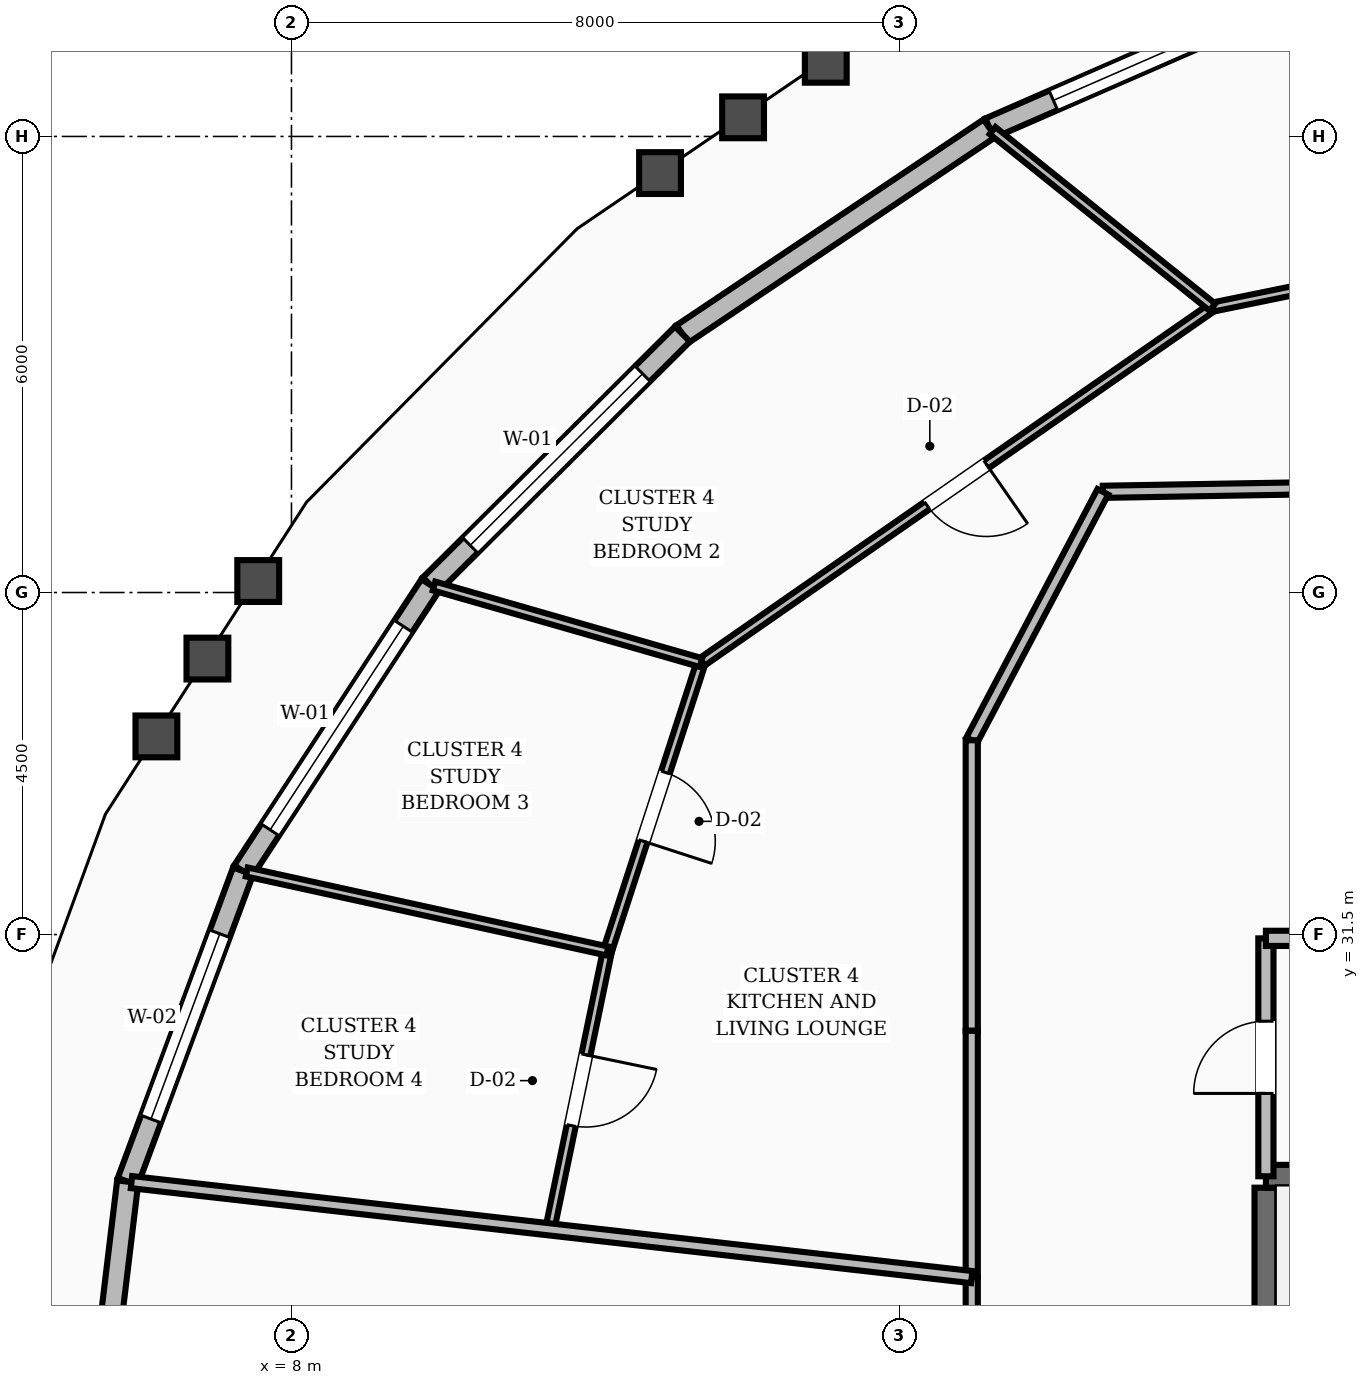
"""IFC4 building model, lengths in metres.
Left out: names, types, materials, properties, quantities, classifications, styles, units other than length and angle.
Written with IfcOpenShell. Run it as: python <this file> out.ifc"""

import sys

from ifc_helpers import new_model, si_unit, direction, frame, frame_2d, origin, place, context, subcontext, project, spatial, rectangle, extrude, element, fill, save


model = new_model("IFC4")
c1 = context("Model", 3, precision=1e-05, world=origin(), true_north=direction((0.0, 1.0)))
c2 = subcontext(c1, "Body", "Model", "MODEL_VIEW")
j1 = project(units=[si_unit("LENGTHUNIT", "METRE"), si_unit("PLANEANGLEUNIT", "RADIAN")], contexts=[c1])
p1 = place(None, origin())
s1 = spatial("IfcSite", under=j1, at=p1, CompositionType="ELEMENT")
p2 = place(p1, origin())
s2 = spatial("IfcBuilding", under=s1, at=p2, CompositionType="ELEMENT")
p3 = place(p2, frame((0.0, 0.0, 124.4)))
s3 = spatial("IfcBuildingStorey", under=s2, at=p3, CompositionType="ELEMENT", Elevation=124.4)
p4 = place(p3, frame((20.82, 19.43, 0.0), z_axis=(0.0, 0.0, 1.0), x_axis=(0.0, 1.0, 0.0)))
e1 = element("IfcWall", 1, at=p4, inside=s3, PredefinedType="SHEAR", context=c2, shape_type="SweptSolid", body=[
    extrude(rectangle(XDim=8.74, YDim=0.3, at=frame_2d((4.37, 0.0))), origin(), (0.0, 0.0, 1.0), 3.6),
])
p5 = place(p3, frame((20.82, 28.32, 0.0), z_axis=(0.0, 0.0, 1.0), x_axis=(1.0, 0.0, 0.0)))
e2 = element("IfcWall", 2, at=p5, inside=s3, PredefinedType="SHEAR", context=c2, shape_type="SweptSolid", body=[
    extrude(rectangle(XDim=3.6, YDim=0.3, at=frame_2d((1.8, 0.0))), origin(), (0.0, 0.0, 1.0), 3.6),
])
p6 = place(p3, frame((21.795, 44.121, 0.0), z_axis=(0.0, 0.0, 1.0), x_axis=(-0.916473381058, -0.400095665825, 0.0)))
e3 = element("IfcWall", 3, at=p6, inside=s3, PredefinedType="STANDARD", context=c2, shape_type="SweptSolid", body=[
    extrude(rectangle(XDim=5.031, YDim=0.28, at=frame_2d((2.515, 0.0))), origin(), (0.0, 0.0, 1.0), 2.82),
])
p7 = place(p6, frame((0.915, 0.0, 0.8)))
e4 = element("IfcOpeningElement", 4, at=p7, cuts=e3, PredefinedType="OPENING", context=c2, shape_type="SweptSolid", body=[
    extrude(rectangle(XDim=3.2, YDim=1.65, at=frame_2d((1.6, 0.825))), frame((0.0, 0.15, 0.0), z_axis=(0.0, -1.0, 0.0), x_axis=(1.0, 0.0, 0.0)), (0.0, 0.0, 1.0), 0.3),
])
p8 = place(p3, frame((17.185, 42.108, 0.0), z_axis=(0.0, 0.0, 1.0), x_axis=(-0.83069663506, -0.556725336679, 0.0)))
e5 = element("IfcWall", 5, at=p8, inside=s3, PredefinedType="STANDARD", context=c2, shape_type="SweptSolid", body=[
    extrude(rectangle(XDim=4.865, YDim=0.28, at=frame_2d((2.432, 0.0))), origin(), (0.0, 0.0, 1.0), 2.82),
])
p9 = place(p3, frame((13.144, 39.4, 0.0), z_axis=(0.0, 0.0, 1.0), x_axis=(-0.708826657364, -0.70538271159, 0.0)))
e6 = element("IfcWall", 6, at=p9, inside=s3, PredefinedType="STANDARD", context=c2, shape_type="SweptSolid", body=[
    extrude(rectangle(XDim=4.679, YDim=0.28, at=frame_2d((2.339, 0.0))), origin(), (0.0, 0.0, 1.0), 2.82),
])
p10 = place(p9, frame((0.74, 0.0, 0.8)))
e7 = element("IfcOpeningElement", 7, at=p10, cuts=e6, PredefinedType="OPENING", context=c2, shape_type="SweptSolid", body=[
    extrude(rectangle(XDim=3.2, YDim=1.65, at=frame_2d((1.6, 0.825))), frame((0.0, 0.15, 0.0), z_axis=(0.0, -1.0, 0.0), x_axis=(1.0, 0.0, 0.0)), (0.0, 0.0, 1.0), 0.3),
])
p11 = place(p3, frame((9.827, 36.1, 0.0), z_axis=(0.0, 0.0, 1.0), x_axis=(-0.547581138096, -0.836752590197, 0.0)))
e8 = element("IfcWall", 8, at=p11, inside=s3, PredefinedType="STANDARD", context=c2, shape_type="SweptSolid", body=[
    extrude(rectangle(XDim=4.5, YDim=0.28, at=frame_2d((2.25, 0.0))), origin(), (0.0, 0.0, 1.0), 2.82),
])
p12 = place(p11, frame((0.65, 0.0, 0.8)))
e9 = element("IfcOpeningElement", 9, at=p12, cuts=e8, PredefinedType="OPENING", context=c2, shape_type="SweptSolid", body=[
    extrude(rectangle(XDim=3.2, YDim=1.65, at=frame_2d((1.6, 0.825))), frame((0.0, 0.15, 0.0), z_axis=(0.0, -1.0, 0.0), x_axis=(1.0, 0.0, 0.0)), (0.0, 0.0, 1.0), 0.3),
])
p13 = place(p3, frame((7.363, 32.334, 0.0), z_axis=(0.0, 0.0, 1.0), x_axis=(-0.348211846364, -0.937415868253, 0.0)))
e10 = element("IfcWall", 10, at=p13, inside=s3, PredefinedType="STANDARD", context=c2, shape_type="SweptSolid", body=[
    extrude(rectangle(XDim=4.358, YDim=0.28, at=frame_2d((2.179, 0.0))), origin(), (0.0, 0.0, 1.0), 2.82),
])
p14 = place(p13, frame((0.879, 0.0, 0.8)))
e11 = element("IfcOpeningElement", 11, at=p14, cuts=e10, PredefinedType="OPENING", context=c2, shape_type="SweptSolid", body=[
    extrude(rectangle(XDim=2.6, YDim=1.65, at=frame_2d((1.3, 0.825))), frame((0.0, 0.15, 0.0), z_axis=(0.0, -1.0, 0.0), x_axis=(1.0, 0.0, 0.0)), (0.0, 0.0, 1.0), 0.3),
])
p15 = place(p3, frame((5.846, 28.249, 0.0), z_axis=(0.0, 0.0, 1.0), x_axis=(-0.119687341708, -0.992811633813, 0.0)))
e12 = element("IfcWall", 12, at=p15, inside=s3, PredefinedType="STANDARD", context=c2, shape_type="SweptSolid", body=[
    extrude(rectangle(XDim=4.28, YDim=0.28, at=frame_2d((2.14, 0.0))), origin(), (0.0, 0.0, 1.0), 2.82),
])
p16 = place(p3, frame((20.82, 28.32, 0.0), z_axis=(0.0, 0.0, 1.0), x_axis=(0.0, 1.0, 0.0)))
e13 = element("IfcWall", 13, at=p16, inside=s3, PredefinedType="SOLIDWALL", context=c2, shape_type="SweptSolid", body=[
    extrude(rectangle(XDim=3.13, YDim=0.2, at=frame_2d((1.565, 0.0))), origin(), (0.0, 0.0, 1.0), 2.8),
])
p17 = place(p16, frame((1.09, 0.0, 0.0)))
e14 = element("IfcOpeningElement", 14, at=p17, cuts=e13, PredefinedType="OPENING", context=c2, shape_type="SweptSolid", body=[
    extrude(rectangle(XDim=0.95, YDim=2.1, at=frame_2d((0.475, 1.05))), frame((0.0, 0.11, 0.0), z_axis=(0.0, -1.0, 0.0), x_axis=(1.0, 0.0, 0.0)), (0.0, 0.0, 1.0), 0.22),
])
p18 = place(p3, frame((20.82, 31.45, 0.0), z_axis=(0.0, 0.0, 1.0), x_axis=(1.0, 0.0, 0.0)))
e15 = element("IfcWall", 15, at=p18, inside=s3, PredefinedType="SOLIDWALL", context=c2, shape_type="SweptSolid", body=[
    extrude(rectangle(XDim=3.98, YDim=0.2, at=frame_2d((1.99, 0.0))), origin(), (0.0, 0.0, 1.0), 2.8),
])
p19 = place(p3, frame((23.046, 37.4, 0.0), z_axis=(0.0, 0.0, 1.0), x_axis=(-0.999853038912, -0.017143528788, 0.0)))
e16 = element("IfcWall", 16, at=p19, inside=s3, PredefinedType="SOLIDWALL", context=c2, shape_type="SweptSolid", body=[
    extrude(rectangle(XDim=4.372, YDim=0.16, at=frame_2d((2.186, 0.0))), origin(), (0.0, 0.0, 1.0), 2.8),
])
p20 = place(p3, frame((18.675, 37.325, 0.0), z_axis=(0.0, 0.0, 1.0), x_axis=(-0.466737093093, -0.884396113702, 0.0)))
e17 = element("IfcWall", 17, at=p20, inside=s3, PredefinedType="SOLIDWALL", context=c2, shape_type="SweptSolid", body=[
    extrude(rectangle(XDim=3.696, YDim=0.16, at=frame_2d((1.848, 0.0))), origin(), (0.0, 0.0, 1.0), 2.8),
])
p21 = place(p3, frame((16.95, 34.056, 0.0), z_axis=(0.0, 0.0, 1.0), x_axis=(0.0, -1.0, 0.0)))
e18 = element("IfcWall", 18, at=p21, inside=s3, PredefinedType="SOLIDWALL", context=c2, shape_type="SweptSolid", body=[
    extrude(rectangle(XDim=3.822, YDim=0.16, at=frame_2d((1.911, 0.0))), origin(), (0.0, 0.0, 1.0), 2.8),
])
p22 = place(p3, frame((16.95, 30.234, 0.0), z_axis=(0.0, 0.0, 1.0), x_axis=(0.0, -1.0, 0.0)))
e19 = element("IfcWall", 19, at=p22, inside=s3, PredefinedType="SOLIDWALL", context=c2, shape_type="SweptSolid", body=[
    extrude(rectangle(XDim=3.24, YDim=0.16, at=frame_2d((1.62, 0.0))), origin(), (0.0, 0.0, 1.0), 2.8),
])
p23 = place(p3, frame((16.95, 26.994, 0.0), z_axis=(0.0, 0.0, 1.0), x_axis=(0.0, -1.0, 0.0)))
e20 = element("IfcWall", 20, at=p23, inside=s3, PredefinedType="SOLIDWALL", context=c2, shape_type="SweptSolid", body=[
    extrude(rectangle(XDim=2.994, YDim=0.16, at=frame_2d((1.497, 0.0))), origin(), (0.0, 0.0, 1.0), 2.8),
])
p24 = place(p3, frame((28.066, 41.38, 0.0), z_axis=(0.0, 0.0, 1.0), x_axis=(-0.979728085565, -0.200331920462, 0.0)))
e21 = element("IfcWall", 21, at=p24, inside=s3, PredefinedType="PARTITIONING", context=c2, shape_type="SweptSolid", body=[
    extrude(rectangle(XDim=8.115, YDim=0.12, at=frame_2d((4.058, 0.0))), origin(), (0.0, 0.0, 1.0), 2.8),
])
p25 = place(p24, frame((4.965, 0.0, 0.0)))
e22 = element("IfcOpeningElement", 22, at=p25, cuts=e21, PredefinedType="OPENING", context=c2, shape_type="SweptSolid", body=[
    extrude(rectangle(XDim=0.95, YDim=2.1, at=frame_2d((0.475, 1.05))), frame((0.0, 0.07, 0.0), z_axis=(0.0, -1.0, 0.0), x_axis=(1.0, 0.0, 0.0)), (0.0, 0.0, 1.0), 0.14),
])
p26 = place(p3, frame((20.115, 39.754, 0.0), z_axis=(0.0, 0.0, 1.0), x_axis=(-0.821091021829, -0.570797279139, 0.0)))
e23 = element("IfcWall", 23, at=p26, inside=s3, PredefinedType="PARTITIONING", context=c2, shape_type="SweptSolid", body=[
    extrude(rectangle(XDim=8.193, YDim=0.12, at=frame_2d((4.096, 0.0))), origin(), (0.0, 0.0, 1.0), 2.8),
])
p27 = place(p26, frame((3.621, 0.0, 0.0)))
e24 = element("IfcOpeningElement", 24, at=p27, cuts=e23, PredefinedType="OPENING", context=c2, shape_type="SweptSolid", body=[
    extrude(rectangle(XDim=0.95, YDim=2.1, at=frame_2d((0.475, 1.05))), frame((0.0, 0.07, 0.0), z_axis=(0.0, -1.0, 0.0), x_axis=(1.0, 0.0, 0.0)), (0.0, 0.0, 1.0), 0.14),
])
p28 = place(p3, frame((20.115, 39.754, 0.0), z_axis=(0.0, 0.0, 1.0), x_axis=(-0.779621413821, 0.626251108671, 0.0)))
e25 = element("IfcWall", 25, at=p28, inside=s3, PredefinedType="PARTITIONING", context=c2, shape_type="SweptSolid", body=[
    extrude(rectangle(XDim=3.709, YDim=0.12, at=frame_2d((1.854, 0.0))), origin(), (0.0, 0.0, 1.0), 2.8),
])
p29 = place(p3, frame((13.389, 35.078, 0.0), z_axis=(0.0, 0.0, 1.0), x_axis=(-0.30891030102, -0.951091176451, 0.0)))
e26 = element("IfcWall", 26, at=p29, inside=s3, PredefinedType="PARTITIONING", context=c2, shape_type="SweptSolid", body=[
    extrude(rectangle(XDim=3.989, YDim=0.12, at=frame_2d((1.994, 0.0))), origin(), (0.0, 0.0, 1.0), 2.8),
])
p30 = place(p29, frame((1.519, 0.0, 0.0)))
e27 = element("IfcOpeningElement", 27, at=p30, cuts=e26, PredefinedType="OPENING", context=c2, shape_type="SweptSolid", body=[
    extrude(rectangle(XDim=0.95, YDim=2.1, at=frame_2d((0.475, 1.05))), frame((0.0, 0.07, 0.0), z_axis=(0.0, -1.0, 0.0), x_axis=(1.0, 0.0, 0.0)), (0.0, 0.0, 1.0), 0.14),
])
p31 = place(p3, frame((13.389, 35.078, 0.0), z_axis=(0.0, 0.0, 1.0), x_axis=(-0.961231001848, 0.275744376347, 0.0)))
e28 = element("IfcWall", 28, at=p31, inside=s3, PredefinedType="PARTITIONING", context=c2, shape_type="SweptSolid", body=[
    extrude(rectangle(XDim=3.655, YDim=0.12, at=frame_2d((1.827, 0.0))), origin(), (0.0, 0.0, 1.0), 2.8),
])
p32 = place(p3, frame((12.156, 31.284, 0.0), z_axis=(0.0, 0.0, 1.0), x_axis=(-0.202776091782, -0.979225130704, 0.0)))
e29 = element("IfcWall", 29, at=p32, inside=s3, PredefinedType="PARTITIONING", context=c2, shape_type="SweptSolid", body=[
    extrude(rectangle(XDim=3.741, YDim=0.12, at=frame_2d((1.87, 0.0))), origin(), (0.0, 0.0, 1.0), 2.8),
])
p33 = place(p32, frame((1.395, 0.0, 0.0)))
e30 = element("IfcOpeningElement", 30, at=p33, cuts=e29, PredefinedType="OPENING", context=c2, shape_type="SweptSolid", body=[
    extrude(rectangle(XDim=0.95, YDim=2.1, at=frame_2d((0.475, 1.05))), frame((0.0, 0.07, 0.0), z_axis=(0.0, -1.0, 0.0), x_axis=(1.0, 0.0, 0.0)), (0.0, 0.0, 1.0), 0.14),
])
p34 = place(p3, frame((12.156, 31.284, 0.0), z_axis=(0.0, 0.0, 1.0), x_axis=(-0.976836684166, 0.213986196907, 0.0)))
e31 = element("IfcWall", 31, at=p34, inside=s3, PredefinedType="PARTITIONING", context=c2, shape_type="SweptSolid", body=[
    extrude(rectangle(XDim=4.857, YDim=0.12, at=frame_2d((2.428, 0.0))), origin(), (0.0, 0.0, 1.0), 2.8),
])
p35 = place(p3, frame((16.95, 26.994, 0.0), z_axis=(0.0, 0.0, 1.0), x_axis=(-0.993672392065, 0.112317306093, 0.0)))
e32 = element("IfcWall", 32, at=p35, inside=s3, PredefinedType="SOLIDWALL", context=c2, shape_type="SweptSolid", body=[
    extrude(rectangle(XDim=11.125, YDim=0.16, at=frame_2d((5.562, 0.0))), origin(), (0.0, 0.0, 1.0), 2.8),
])
p36 = place(p7, origin())
e33 = element("IfcWindow", 33, at=p36, inside=s3, PartitioningType="SINGLE_PANEL", PredefinedType="WINDOW", context=c2, shape_type="SweptSolid", body=[
    extrude(rectangle(XDim=3.2, YDim=1.65, at=frame_2d((1.6, 0.825))), frame((0.0, 0.03, 0.0), z_axis=(0.0, -1.0, 0.0), x_axis=(1.0, 0.0, 0.0)), (0.0, 0.0, 1.0), 0.06),
])
fill(e4, e33)
p37 = place(p10, origin())
e34 = element("IfcWindow", 34, at=p37, inside=s3, PartitioningType="SINGLE_PANEL", PredefinedType="WINDOW", context=c2, shape_type="SweptSolid", body=[
    extrude(rectangle(XDim=3.2, YDim=1.65, at=frame_2d((1.6, 0.825))), frame((0.0, 0.03, 0.0), z_axis=(0.0, -1.0, 0.0), x_axis=(1.0, 0.0, 0.0)), (0.0, 0.0, 1.0), 0.06),
])
fill(e7, e34)
p38 = place(p12, origin())
e35 = element("IfcWindow", 35, at=p38, inside=s3, PartitioningType="SINGLE_PANEL", PredefinedType="WINDOW", context=c2, shape_type="SweptSolid", body=[
    extrude(rectangle(XDim=3.2, YDim=1.65, at=frame_2d((1.6, 0.825))), frame((0.0, 0.03, 0.0), z_axis=(0.0, -1.0, 0.0), x_axis=(1.0, 0.0, 0.0)), (0.0, 0.0, 1.0), 0.06),
])
fill(e9, e35)
p39 = place(p14, origin())
e36 = element("IfcWindow", 36, at=p39, inside=s3, PartitioningType="SINGLE_PANEL", PredefinedType="WINDOW", context=c2, shape_type="SweptSolid", body=[
    extrude(rectangle(XDim=2.6, YDim=1.65, at=frame_2d((1.3, 0.825))), frame((0.0, 0.03, 0.0), z_axis=(0.0, -1.0, 0.0), x_axis=(1.0, 0.0, 0.0)), (0.0, 0.0, 1.0), 0.06),
])
fill(e11, e36)
p40 = place(p17, origin())
e37 = element("IfcDoor", 37, at=p40, inside=s3, OperationType="SINGLE_SWING_LEFT", PredefinedType="DOOR", context=c2, shape_type="SweptSolid", body=[
    extrude(rectangle(XDim=0.95, YDim=2.1, at=frame_2d((0.475, 1.05))), frame((0.0, 0.025, 0.0), z_axis=(0.0, -1.0, 0.0), x_axis=(1.0, 0.0, 0.0)), (0.0, 0.0, 1.0), 0.05),
])
fill(e14, e37)
p41 = place(p27, origin())
e38 = element("IfcDoor", 38, at=p41, inside=s3, OperationType="SINGLE_SWING_LEFT", PredefinedType="DOOR", context=c2, shape_type="SweptSolid", body=[
    extrude(rectangle(XDim=0.95, YDim=2.1, at=frame_2d((0.475, 1.05))), frame((0.0, 0.025, 0.0), z_axis=(0.0, -1.0, 0.0), x_axis=(1.0, 0.0, 0.0)), (0.0, 0.0, 1.0), 0.05),
])
fill(e24, e38)
p42 = place(p30, origin())
e39 = element("IfcDoor", 39, at=p42, inside=s3, OperationType="SINGLE_SWING_RIGHT", PredefinedType="DOOR", context=c2, shape_type="SweptSolid", body=[
    extrude(rectangle(XDim=0.95, YDim=2.1, at=frame_2d((0.475, 1.05))), frame((0.0, 0.025, 0.0), z_axis=(0.0, -1.0, 0.0), x_axis=(1.0, 0.0, 0.0)), (0.0, 0.0, 1.0), 0.05),
])
fill(e27, e39)
p43 = place(p33, origin())
e40 = element("IfcDoor", 40, at=p43, inside=s3, OperationType="SINGLE_SWING_LEFT", PredefinedType="DOOR", context=c2, shape_type="SweptSolid", body=[
    extrude(rectangle(XDim=0.95, YDim=2.1, at=frame_2d((0.475, 1.05))), frame((0.0, 0.025, 0.0), z_axis=(0.0, -1.0, 0.0), x_axis=(1.0, 0.0, 0.0)), (0.0, 0.0, 1.0), 0.05),
])
fill(e30, e40)
save(model, sys.argv[1])
